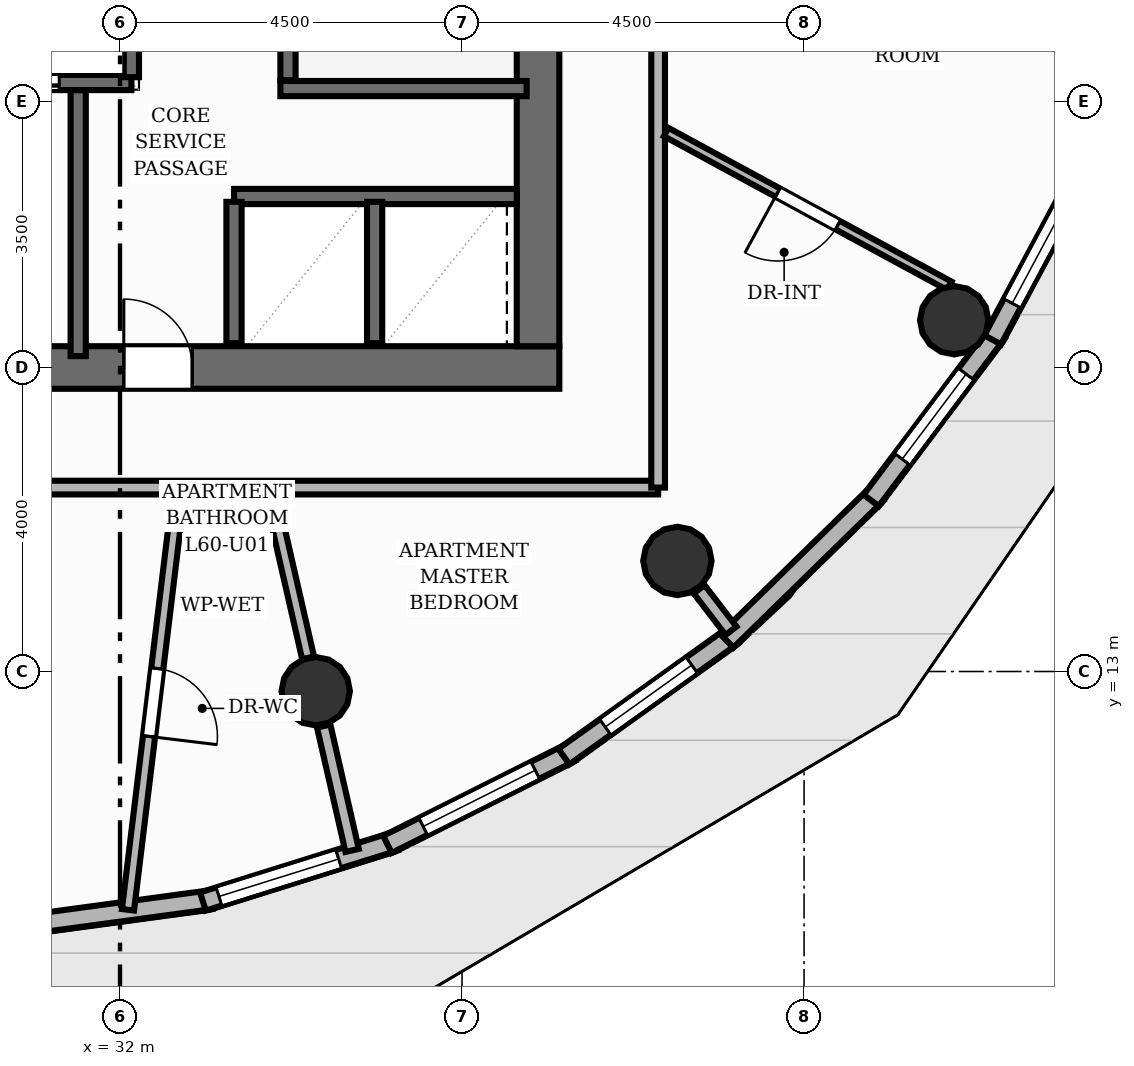
"""IFC4 building model, lengths in metres.
Left out: names, types, materials, properties, quantities, classifications, styles, units other than length and angle.
Written with IfcOpenShell. Run it as: python <this file> out.ifc"""

import sys

from ifc_helpers import new_model, si_unit, direction, frame, frame_2d, origin, origin_2d, place, context, subcontext, project, spatial, rectangle, circle, extrude, element, fill, save


model = new_model("IFC4")
c1 = context("Model", 3, precision=1e-05, world=origin(), true_north=direction((0.0, 1.0)))
c2 = subcontext(c1, "Body", "Model", "MODEL_VIEW")
j1 = project(units=[si_unit("LENGTHUNIT", "METRE"), si_unit("PLANEANGLEUNIT", "RADIAN")], contexts=[c1])
p1 = place(None, origin())
s1 = spatial("IfcSite", under=j1, at=p1, CompositionType="ELEMENT")
p2 = place(p1, origin())
s2 = spatial("IfcBuilding", under=s1, at=p2, CompositionType="ELEMENT")
p3 = place(p2, frame((0.0, 0.0, 201.44)))
s3 = spatial("IfcBuildingStorey", under=s2, at=p3, CompositionType="ELEMENT", Elevation=201.44)
p4 = place(p3, frame((26.22, 17.0, 0.0), z_axis=(0.0, 0.0, 1.0), x_axis=(1.0, 0.0, 0.0)))
e1 = element("IfcWall", 1, at=p4, inside=s3, PredefinedType="SHEAR", context=c2, shape_type="SweptSolid", body=[
    extrude(rectangle(XDim=11.56, YDim=0.56, at=frame_2d((5.78, 0.0))), origin(), (0.0, 0.0, 1.0), 3.2),
])
p5 = place(p4, frame((2.28, 0.0, 0.0)))
e2 = element("IfcOpeningElement", 2, at=p5, cuts=e1, PredefinedType="OPENING", context=c2, shape_type="SweptSolid", body=[
    extrude(rectangle(XDim=1.1, YDim=2.15, at=frame_2d((0.55, 1.075))), frame((0.0, 0.29, 0.0), z_axis=(0.0, -1.0, 0.0), x_axis=(1.0, 0.0, 0.0)), (0.0, 0.0, 1.0), 0.58),
])
p6 = place(p4, frame((5.83, 0.0, 0.0)))
e3 = element("IfcOpeningElement", 3, at=p6, cuts=e1, PredefinedType="OPENING", context=c2, shape_type="SweptSolid", body=[
    extrude(rectangle(XDim=0.9, YDim=2.1, at=frame_2d((0.45, 1.05))), frame((0.0, 0.29, 0.0), z_axis=(0.0, -1.0, 0.0), x_axis=(1.0, 0.0, 0.0)), (0.0, 0.0, 1.0), 0.58),
])
p7 = place(p3, frame((37.5, 17.28, 0.0), z_axis=(0.0, 0.0, 1.0), x_axis=(0.0, 1.0, 0.0)))
e4 = element("IfcWall", 4, at=p7, inside=s3, PredefinedType="SHEAR", context=c2, shape_type="SweptSolid", body=[
    extrude(rectangle(XDim=13.44, YDim=0.56, at=frame_2d((6.72, 0.0))), origin(), (0.0, 0.0, 1.0), 3.2),
])
for number, where, z_axis, x_axis in (
    (5, (34.575, 12.74, 0.0), (0.0, 0.0, 1.0), (1.0, 0.0, 0.0)),
    (6, (39.333, 14.455, 0.0), (0.0, 0.0, 1.0), (1.0, 0.0, 0.0)),
    (7, (42.975, 17.622, 0.0), (0.0, 0.0, 1.0), (1.0, 0.0, 0.0)),
):
    element("IfcColumn", number, at=place(p3, frame(where, z_axis=z_axis, x_axis=x_axis)), inside=s3, PredefinedType="COLUMN", context=c2, shape_type="SweptSolid", body=[
        extrude(circle(Radius=0.45, at=origin_2d()), origin(), (0.0, 0.0, 1.0), 3.2),
    ])
p8 = place(p3, frame((33.199, 9.998, 0.0), z_axis=(0.0, 0.0, 1.0), x_axis=(-0.990951844978, -0.134217886046, 0.0)))
e8 = element("IfcWall", 8, at=p8, inside=s3, PredefinedType="SOLIDWALL", context=c2, shape_type="SweptSolid", body=[
    extrude(rectangle(XDim=2.592, YDim=0.25, at=frame_2d((1.296, 0.0))), origin(), (0.0, 0.0, 1.0), 2.96),
])
p9 = place(p3, frame((35.621, 10.766, 0.0), z_axis=(0.0, 0.0, 1.0), x_axis=(-0.954307768746, -0.298825505122, 0.0)))
e9 = element("IfcWall", 9, at=p9, inside=s3, PredefinedType="SOLIDWALL", context=c2, shape_type="SweptSolid", body=[
    extrude(rectangle(XDim=2.651, YDim=0.25, at=frame_2d((1.326, 0.0))), origin(), (0.0, 0.0, 1.0), 2.96),
])
p10 = place(p9, frame((0.78, 0.0, 0.85)))
e10 = element("IfcOpeningElement", 10, at=p10, cuts=e9, PredefinedType="OPENING", context=c2, shape_type="SweptSolid", body=[
    extrude(rectangle(XDim=1.65, YDim=1.52, at=frame_2d((0.825, 0.76))), frame((0.0, 0.135, 0.0), z_axis=(0.0, -1.0, 0.0), x_axis=(1.0, 0.0, 0.0)), (0.0, 0.0, 1.0), 0.27),
])
p11 = place(p3, frame((37.934, 11.937, 0.0), z_axis=(0.0, 0.0, 1.0), x_axis=(-0.893757522153, -0.448550433724, 0.0)))
e11 = element("IfcWall", 11, at=p11, inside=s3, PredefinedType="SOLIDWALL", context=c2, shape_type="SweptSolid", body=[
    extrude(rectangle(XDim=2.702, YDim=0.25, at=frame_2d((1.351, 0.0))), origin(), (0.0, 0.0, 1.0), 2.96),
])
p12 = place(p11, frame((0.526, 0.0, 0.85)))
e12 = element("IfcOpeningElement", 12, at=p12, cuts=e11, PredefinedType="OPENING", context=c2, shape_type="SweptSolid", body=[
    extrude(rectangle(XDim=1.65, YDim=1.55, at=frame_2d((0.825, 0.775))), frame((0.0, 0.135, 0.0), z_axis=(0.0, -1.0, 0.0), x_axis=(1.0, 0.0, 0.0)), (0.0, 0.0, 1.0), 0.27),
])
p13 = place(p3, frame((40.066, 13.474, 0.0), z_axis=(0.0, 0.0, 1.0), x_axis=(-0.812997900305, -0.58226661771, 0.0)))
e13 = element("IfcWall", 13, at=p13, inside=s3, PredefinedType="SOLIDWALL", context=c2, shape_type="SweptSolid", body=[
    extrude(rectangle(XDim=2.739, YDim=0.25, at=frame_2d((1.369, 0.0))), origin(), (0.0, 0.0, 1.0), 2.96),
])
p14 = place(p13, frame((0.669, 0.0, 0.85)))
e14 = element("IfcOpeningElement", 14, at=p14, cuts=e13, PredefinedType="OPENING", context=c2, shape_type="SweptSolid", body=[
    extrude(rectangle(XDim=1.4, YDim=1.55, at=frame_2d((0.7, 0.775))), frame((0.0, 0.135, 0.0), z_axis=(0.0, -1.0, 0.0), x_axis=(1.0, 0.0, 0.0)), (0.0, 0.0, 1.0), 0.27),
])
p15 = place(p3, frame((41.955, 15.333, 0.0), z_axis=(0.0, 0.0, 1.0), x_axis=(-0.71485422762, -0.699273503898, 0.0)))
e15 = element("IfcWall", 15, at=p15, inside=s3, PredefinedType="SOLIDWALL", context=c2, shape_type="SweptSolid", body=[
    extrude(rectangle(XDim=2.758, YDim=0.25, at=frame_2d((1.379, 0.0))), origin(), (0.0, 0.0, 1.0), 2.96),
])
p16 = place(p3, frame((43.54, 17.456, 0.0), z_axis=(0.0, 0.0, 1.0), x_axis=(-0.600877762795, -0.799340924874, 0.0)))
e16 = element("IfcWall", 16, at=p16, inside=s3, PredefinedType="SOLIDWALL", context=c2, shape_type="SweptSolid", body=[
    extrude(rectangle(XDim=2.758, YDim=0.25, at=frame_2d((1.379, 0.0))), origin(), (0.0, 0.0, 1.0), 2.96),
])
p17 = place(p16, frame((0.679, 0.0, 0.85)))
e17 = element("IfcOpeningElement", 17, at=p17, cuts=e16, PredefinedType="OPENING", context=c2, shape_type="SweptSolid", body=[
    extrude(rectangle(XDim=1.4, YDim=1.55, at=frame_2d((0.7, 0.775))), frame((0.0, 0.135, 0.0), z_axis=(0.0, -1.0, 0.0), x_axis=(1.0, 0.0, 0.0)), (0.0, 0.0, 1.0), 0.27),
])
p18 = place(p3, frame((44.774, 19.779, 0.0), z_axis=(0.0, 0.0, 1.0), x_axis=(-0.472035862223, -0.88157934684, 0.0)))
e18 = element("IfcWall", 18, at=p18, inside=s3, PredefinedType="SOLIDWALL", context=c2, shape_type="SweptSolid", body=[
    extrude(rectangle(XDim=2.739, YDim=0.25, at=frame_2d((1.369, 0.0))), origin(), (0.0, 0.0, 1.0), 2.96),
])
p19 = place(p18, frame((0.544, 0.0, 0.85)))
e19 = element("IfcOpeningElement", 19, at=p19, cuts=e18, PredefinedType="OPENING", context=c2, shape_type="SweptSolid", body=[
    extrude(rectangle(XDim=1.65, YDim=1.55, at=frame_2d((0.825, 0.775))), frame((0.0, 0.135, 0.0), z_axis=(0.0, -1.0, 0.0), x_axis=(1.0, 0.0, 0.0)), (0.0, 0.0, 1.0), 0.27),
])
p20 = place(p3, frame((34.21, 20.78, 0.0), z_axis=(0.0, 0.0, 1.0), x_axis=(0.0, 1.0, 0.0)))
e20 = element("IfcWall", 20, at=p20, inside=s3, PredefinedType="SHEAR", context=c2, shape_type="SweptSolid", body=[
    extrude(rectangle(XDim=6.44, YDim=0.2, at=frame_2d((3.22, 0.0))), origin(), (0.0, 0.0, 1.0), 3.2),
])
p21 = place(p3, frame((34.11, 20.67, 0.0), z_axis=(0.0, 0.0, 1.0), x_axis=(1.0, 0.0, 0.0)))
e21 = element("IfcWall", 21, at=p21, inside=s3, PredefinedType="SHEAR", context=c2, shape_type="SweptSolid", body=[
    extrude(rectangle(XDim=3.24, YDim=0.2, at=frame_2d((1.62, 0.0))), origin(), (0.0, 0.0, 1.0), 3.2),
])
p22 = place(p3, frame((31.45, 17.15, 0.0), z_axis=(0.0, 0.0, 1.0), x_axis=(0.0, 1.0, 0.0)))
e22 = element("IfcWall", 22, at=p22, inside=s3, PredefinedType="SHEAR", context=c2, shape_type="SweptSolid", body=[
    extrude(rectangle(XDim=3.5, YDim=0.2, at=frame_2d((1.75, 0.0))), origin(), (0.0, 0.0, 1.0), 3.2),
])
p23 = place(p3, frame((29.85, 20.75, 0.0), z_axis=(0.0, 0.0, 1.0), x_axis=(1.0, 0.0, 0.0)))
e23 = element("IfcWall", 23, at=p23, inside=s3, PredefinedType="SHEAR", context=c2, shape_type="SweptSolid", body=[
    extrude(rectangle(XDim=2.3, YDim=0.2, at=frame_2d((1.15, 0.0))), origin(), (0.0, 0.0, 1.0), 3.2),
])
p24 = place(p23, frame((0.25, 0.0, 0.0)))
e24 = element("IfcOpeningElement", 24, at=p24, cuts=e23, PredefinedType="OPENING", context=c2, shape_type="SweptSolid", body=[
    extrude(rectangle(XDim=1.1, YDim=2.15, at=frame_2d((0.55, 1.075))), frame((0.0, 0.11, 0.0), z_axis=(0.0, -1.0, 0.0), x_axis=(1.0, 0.0, 0.0)), (0.0, 0.0, 1.0), 0.22),
])
p25 = place(p3, frame((32.15, 20.82, 0.0), z_axis=(0.0, 0.0, 1.0), x_axis=(0.0, 1.0, 0.0)))
e25 = element("IfcWall", 25, at=p25, inside=s3, PredefinedType="SHEAR", context=c2, shape_type="SweptSolid", body=[
    extrude(rectangle(XDim=1.71, YDim=0.2, at=frame_2d((0.855, 0.0))), origin(), (0.0, 0.0, 1.0), 3.2),
])
p26 = place(p3, frame((33.5, 19.25, 0.0), z_axis=(0.0, 0.0, 1.0), x_axis=(1.0, 0.0, 0.0)))
e26 = element("IfcWall", 26, at=p26, inside=s3, PredefinedType="SHEAR", context=c2, shape_type="SweptSolid", body=[
    extrude(rectangle(XDim=3.72, YDim=0.2, at=frame_2d((1.86, 0.0))), origin(), (0.0, 0.0, 1.0), 3.2),
])
for number, where, z_axis, x_axis in (
    (27, (33.5, 17.32, 0.0), (0.0, 0.0, 1.0), (0.0, 1.0, 0.0)),
    (28, (35.35, 17.32, 0.0), (0.0, 0.0, 1.0), (0.0, 1.0, 0.0)),
):
    element("IfcWall", number, at=place(p3, frame(where, z_axis=z_axis, x_axis=x_axis)), inside=s3, PredefinedType="SHEAR", context=c2, shape_type="SweptSolid", body=[
        extrude(rectangle(XDim=1.86, YDim=0.2, at=frame_2d((0.93, 0.0))), origin(), (0.0, 0.0, 1.0), 3.2),
    ])
p27 = place(p3, frame((34.68, 12.282, 0.0), z_axis=(0.0, 0.0, 1.0), x_axis=(0.222978827263, -0.97482328788, 0.0)))
e29 = element("IfcWall", 29, at=p27, inside=s3, PredefinedType="PARTITIONING", context=c2, shape_type="SweptSolid", body=[
    extrude(rectangle(XDim=1.678, YDim=0.18, at=frame_2d((0.839, 0.0))), origin(), (0.0, 0.0, 1.0), 2.404),
])
p28 = place(p3, frame((39.62, 14.082, 0.0), z_axis=(0.0, 0.0, 1.0), x_axis=(0.60904199592, -0.793137974885, 0.0)))
e30 = element("IfcWall", 30, at=p28, inside=s3, PredefinedType="PARTITIONING", context=c2, shape_type="SweptSolid", body=[
    extrude(rectangle(XDim=0.688, YDim=0.18, at=frame_2d((0.344, 0.0))), origin(), (0.0, 0.0, 1.0), 2.404),
])
p29 = place(p3, frame((39.08, 15.42, 0.0), z_axis=(0.0, 0.0, 1.0), x_axis=(-1.0, 0.0, 0.0)))
e31 = element("IfcWall", 31, at=p29, inside=s3, PredefinedType="PARTITIONING", context=c2, shape_type="SweptSolid", body=[
    extrude(rectangle(XDim=14.16, YDim=0.18, at=frame_2d((7.08, 0.0))), origin(), (0.0, 0.0, 1.0), 2.955),
])
p30 = place(p29, frame((8.155, 0.0, 0.0)))
e32 = element("IfcOpeningElement", 32, at=p30, cuts=e31, PredefinedType="OPENING", context=c2, shape_type="SweptSolid", body=[
    extrude(rectangle(XDim=1.05, YDim=2.15, at=frame_2d((0.525, 1.075))), frame((0.0, 0.1, 0.0), z_axis=(0.0, -1.0, 0.0), x_axis=(1.0, 0.0, 0.0)), (0.0, 0.0, 1.0), 0.2),
])
p31 = place(p3, frame((39.08, 30.508, 0.0), z_axis=(0.0, 0.0, 1.0), x_axis=(0.0, -1.0, 0.0)))
e33 = element("IfcWall", 33, at=p31, inside=s3, PredefinedType="PARTITIONING", context=c2, shape_type="SweptSolid", body=[
    extrude(rectangle(XDim=15.088, YDim=0.18, at=frame_2d((7.544, 0.0))), origin(), (0.0, 0.0, 1.0), 2.955),
])
p32 = place(p31, frame((7.548, 0.0, 0.0)))
e34 = element("IfcOpeningElement", 34, at=p32, cuts=e33, PredefinedType="OPENING", context=c2, shape_type="SweptSolid", body=[
    extrude(rectangle(XDim=1.05, YDim=2.15, at=frame_2d((0.525, 1.075))), frame((0.0, 0.1, 0.0), z_axis=(0.0, -1.0, 0.0), x_axis=(1.0, 0.0, 0.0)), (0.0, 0.0, 1.0), 0.2),
])
p33 = place(p3, frame((32.768, 15.321, 0.0), z_axis=(0.0, 0.0, 1.0), x_axis=(-0.120556883214, -0.992706420806, 0.0)))
e35 = element("IfcWall", 35, at=p33, inside=s3, PredefinedType="PLUMBINGWALL", context=c2, shape_type="SweptSolid", body=[
    extrude(rectangle(XDim=5.496, YDim=0.16, at=frame_2d((2.748, 0.0))), origin(), (0.0, 0.0, 1.0), 2.692),
])
p34 = place(p33, frame((2.298, 0.0, 0.0)))
e36 = element("IfcOpeningElement", 36, at=p34, cuts=e35, PredefinedType="OPENING", context=c2, shape_type="SweptSolid", body=[
    extrude(rectangle(XDim=0.9, YDim=2.1, at=frame_2d((0.45, 1.05))), frame((0.0, 0.09, 0.0), z_axis=(0.0, -1.0, 0.0), x_axis=(1.0, 0.0, 0.0)), (0.0, 0.0, 1.0), 0.18),
])
p35 = place(p3, frame((33.985, 15.323, 0.0), z_axis=(0.0, 0.0, 1.0), x_axis=(0.222969522248, -0.974825416241, 0.0)))
e37 = element("IfcWall", 37, at=p35, inside=s3, PredefinedType="PLUMBINGWALL", context=c2, shape_type="SweptSolid", body=[
    extrude(rectangle(XDim=2.199, YDim=0.16, at=frame_2d((1.099, 0.0))), origin(), (0.0, 0.0, 1.0), 2.404),
])
p36 = place(p3, frame((42.911, 18.075, 0.0), z_axis=(0.0, 0.0, 1.0), x_axis=(-0.878816171277, 0.477160494071, 0.0)))
e38 = element("IfcWall", 38, at=p36, inside=s3, PredefinedType="PARTITIONING", context=c2, shape_type="SweptSolid", body=[
    extrude(rectangle(XDim=4.239, YDim=0.125, at=frame_2d((2.12, 0.0))), origin(), (0.0, 0.0, 1.0), 2.404),
])
p37 = place(p36, frame((1.67, 0.0, 0.0)))
e39 = element("IfcOpeningElement", 39, at=p37, cuts=e38, PredefinedType="OPENING", context=c2, shape_type="SweptSolid", body=[
    extrude(rectangle(XDim=0.9, YDim=2.1, at=frame_2d((0.45, 1.05))), frame((0.0, 0.073, 0.0), z_axis=(0.0, -1.0, 0.0), x_axis=(1.0, 0.0, 0.0)), (0.0, 0.0, 1.0), 0.145),
])
p38 = place(p10, origin())
e40 = element("IfcWindow", 40, at=p38, inside=s3, PartitioningType="SINGLE_PANEL", PredefinedType="WINDOW", context=c2, shape_type="SweptSolid", body=[
    extrude(rectangle(XDim=1.65, YDim=1.52, at=frame_2d((0.825, 0.76))), frame((0.0, 0.03, 0.0), z_axis=(0.0, -1.0, 0.0), x_axis=(1.0, 0.0, 0.0)), (0.0, 0.0, 1.0), 0.06),
])
fill(e10, e40)
p39 = place(p12, origin())
e41 = element("IfcWindow", 41, at=p39, inside=s3, PartitioningType="SINGLE_PANEL", PredefinedType="WINDOW", context=c2, shape_type="SweptSolid", body=[
    extrude(rectangle(XDim=1.65, YDim=1.55, at=frame_2d((0.825, 0.775))), frame((0.0, 0.03, 0.0), z_axis=(0.0, -1.0, 0.0), x_axis=(1.0, 0.0, 0.0)), (0.0, 0.0, 1.0), 0.06),
])
fill(e12, e41)
p40 = place(p14, origin())
e42 = element("IfcWindow", 42, at=p40, inside=s3, PartitioningType="SINGLE_PANEL", PredefinedType="WINDOW", context=c2, shape_type="SweptSolid", body=[
    extrude(rectangle(XDim=1.4, YDim=1.55, at=frame_2d((0.7, 0.775))), frame((0.0, 0.03, 0.0), z_axis=(0.0, -1.0, 0.0), x_axis=(1.0, 0.0, 0.0)), (0.0, 0.0, 1.0), 0.06),
])
fill(e14, e42)
p41 = place(p17, origin())
e43 = element("IfcWindow", 43, at=p41, inside=s3, PartitioningType="SINGLE_PANEL", PredefinedType="WINDOW", context=c2, shape_type="SweptSolid", body=[
    extrude(rectangle(XDim=1.4, YDim=1.55, at=frame_2d((0.7, 0.775))), frame((0.0, 0.03, 0.0), z_axis=(0.0, -1.0, 0.0), x_axis=(1.0, 0.0, 0.0)), (0.0, 0.0, 1.0), 0.06),
])
fill(e17, e43)
p42 = place(p19, origin())
e44 = element("IfcWindow", 44, at=p42, inside=s3, PartitioningType="SINGLE_PANEL", PredefinedType="WINDOW", context=c2, shape_type="SweptSolid", body=[
    extrude(rectangle(XDim=1.65, YDim=1.55, at=frame_2d((0.825, 0.775))), frame((0.0, 0.03, 0.0), z_axis=(0.0, -1.0, 0.0), x_axis=(1.0, 0.0, 0.0)), (0.0, 0.0, 1.0), 0.06),
])
fill(e19, e44)
p43 = place(p24, origin())
e45 = element("IfcDoor", 45, at=p43, inside=s3, OperationType="DOUBLE_DOOR_SLIDING", PredefinedType="DOOR", context=c2, shape_type="SweptSolid", body=[
    extrude(rectangle(XDim=1.1, YDim=2.15, at=frame_2d((0.55, 1.075))), frame((0.0, 0.025, 0.0), z_axis=(0.0, -1.0, 0.0), x_axis=(1.0, 0.0, 0.0)), (0.0, 0.0, 1.0), 0.05),
])
fill(e24, e45)
p44 = place(p6, origin())
e46 = element("IfcDoor", 46, at=p44, inside=s3, OperationType="SINGLE_SWING_LEFT", PredefinedType="DOOR", context=c2, shape_type="SweptSolid", body=[
    extrude(rectangle(XDim=0.9, YDim=2.1, at=frame_2d((0.45, 1.05))), frame((0.0, 0.025, 0.0), z_axis=(0.0, -1.0, 0.0), x_axis=(1.0, 0.0, 0.0)), (0.0, 0.0, 1.0), 0.05),
])
fill(e3, e46)
p45 = place(p34, origin())
e47 = element("IfcDoor", 47, at=p45, inside=s3, OperationType="SINGLE_SWING_RIGHT", PredefinedType="DOOR", context=c2, shape_type="SweptSolid", body=[
    extrude(rectangle(XDim=0.9, YDim=2.1, at=frame_2d((0.45, 1.05))), frame((0.0, 0.025, 0.0), z_axis=(0.0, -1.0, 0.0), x_axis=(1.0, 0.0, 0.0)), (0.0, 0.0, 1.0), 0.05),
])
fill(e36, e47)
p46 = place(p37, origin())
e48 = element("IfcDoor", 48, at=p46, inside=s3, OperationType="SINGLE_SWING_RIGHT", PredefinedType="DOOR", context=c2, shape_type="SweptSolid", body=[
    extrude(rectangle(XDim=0.9, YDim=2.1, at=frame_2d((0.45, 1.05))), frame((0.0, 0.025, 0.0), z_axis=(0.0, -1.0, 0.0), x_axis=(1.0, 0.0, 0.0)), (0.0, 0.0, 1.0), 0.05),
])
fill(e39, e48)
save(model, sys.argv[1])
